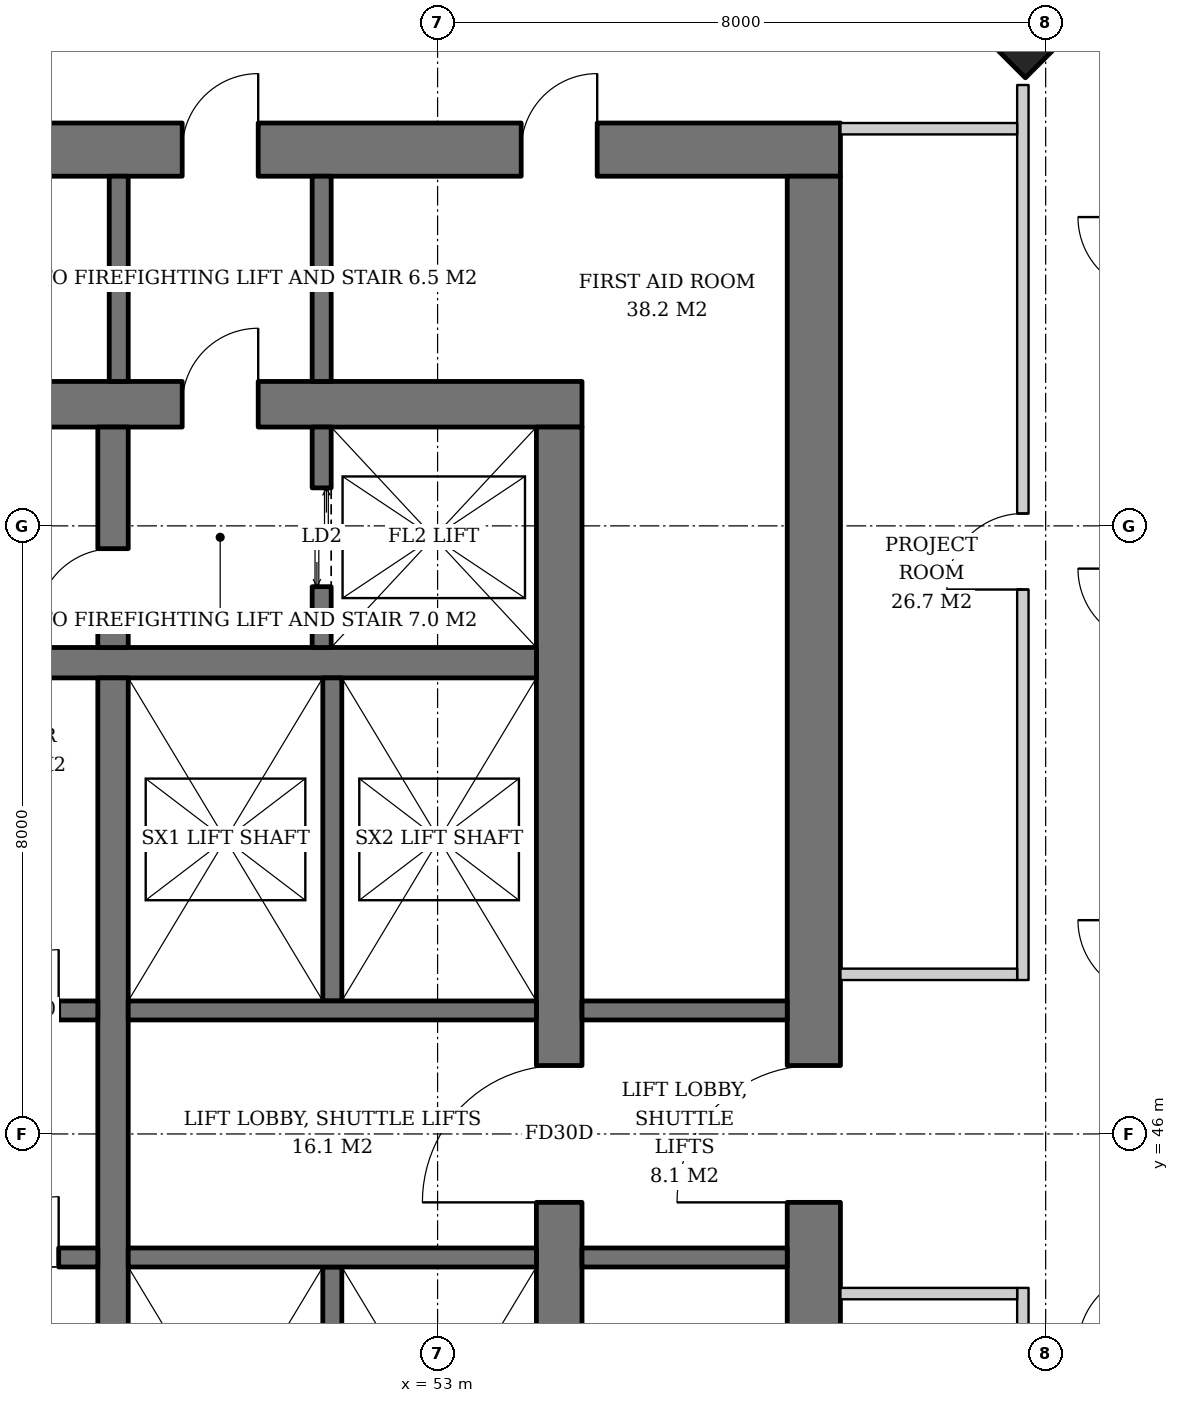
"""IFC4 building model, lengths in metres.
Left out: names, types, materials, properties, quantities, classifications, styles, units other than length and angle.
Written with IfcOpenShell. Run it as: python <this file> out.ifc"""

import sys

from ifc_helpers import new_model, si_unit, direction, frame, frame_2d, origin, origin_2d, place, context, subcontext, project, spatial, rectangle, extrude, element, fill, save


model = new_model("IFC4")
c1 = context("Model", 3, precision=1e-05, world=origin(), true_north=direction((0.0, 1.0)))
c2 = subcontext(c1, "Body", "Model", "MODEL_VIEW")
j1 = project(units=[si_unit("LENGTHUNIT", "METRE"), si_unit("PLANEANGLEUNIT", "RADIAN")], contexts=[c1])
p1 = place(None, origin())
s1 = spatial("IfcSite", under=j1, at=p1, CompositionType="ELEMENT")
p2 = place(p1, origin())
s2 = spatial("IfcBuilding", under=s1, at=p2, CompositionType="ELEMENT")
p3 = place(p2, frame((0.0, 0.0, 150.2)))
s3 = spatial("IfcBuildingStorey", under=s2, at=p3, CompositionType="ELEMENT", Elevation=150.2)
p4 = place(p3, frame((60.771, 61.771, 0.0), z_axis=(-0.031962158256, -0.031962158256, 0.998977898093), x_axis=(0.707106781187, -0.707106781187, 0.0)))
e1 = element("IfcColumn", 1, at=p4, inside=s3, PredefinedType="COLUMN", context=c2, shape_type="SweptSolid", body=[
    extrude(rectangle(XDim=2.6, YDim=2.6, at=origin_2d()), origin(), (0.0, 0.0, 1.0), 3.804),
])
p5 = place(p3, frame((35.1, 55.6, 0.0), z_axis=(0.0, 0.0, 1.0), x_axis=(1.0, 0.0, 0.0)))
e2 = element("IfcWall", 2, at=p5, inside=s3, PredefinedType="SHEAR", context=c2, shape_type="SweptSolid", body=[
    extrude(rectangle(XDim=19.8, YDim=0.6, at=frame_2d((9.9, 0.0))), origin(), (0.0, 0.0, 1.0), 3.8),
])
p6 = place(p5, frame((14.54, 0.0, 0.0)))
e3 = element("IfcOpeningElement", 3, at=p6, cuts=e2, PredefinedType="OPENING", context=c2, shape_type="SweptSolid", body=[
    extrude(rectangle(XDim=1.0, YDim=2.1, at=frame_2d((0.5, 1.05))), frame((0.0, 0.31, 0.0), z_axis=(0.0, -1.0, 0.0), x_axis=(1.0, 0.0, 0.0)), (0.0, 0.0, 1.0), 0.62),
])
p7 = place(p5, frame((2.425, 0.0, 0.0)))
e4 = element("IfcOpeningElement", 4, at=p7, cuts=e2, PredefinedType="OPENING", context=c2, shape_type="SweptSolid", body=[
    extrude(rectangle(XDim=1.0, YDim=2.1, at=frame_2d((0.5, 1.05))), frame((0.0, 0.31, 0.0), z_axis=(0.0, -1.0, 0.0), x_axis=(1.0, 0.0, 0.0)), (0.0, 0.0, 1.0), 0.62),
])
p8 = place(p3, frame((54.6, 36.7, 0.0), z_axis=(0.0, 0.0, 1.0), x_axis=(0.0, 1.0, 0.0)))
e5 = element("IfcWall", 5, at=p8, inside=s3, PredefinedType="SHEAR", context=c2, shape_type="SweptSolid", body=[
    extrude(rectangle(XDim=18.6, YDim=0.6, at=frame_2d((9.3, 0.0))), origin(), (0.0, 0.0, 1.0), 3.8),
])
p9 = place(p8, frame((8.4, 0.0, 0.0)))
e6 = element("IfcOpeningElement", 6, at=p9, cuts=e5, PredefinedType="OPENING", context=c2, shape_type="SweptSolid", body=[
    extrude(rectangle(XDim=1.8, YDim=2.4, at=frame_2d((0.9, 1.2))), frame((0.0, 0.31, 0.0), z_axis=(0.0, -1.0, 0.0), x_axis=(1.0, 0.0, 0.0)), (0.0, 0.0, 1.0), 0.62),
])
p10 = place(p3, frame((31.7, 58.95, 0.0), z_axis=(0.0, 0.0, 1.0), x_axis=(1.0, 0.0, 0.0)))
e7 = element("IfcWall", 7, at=p10, inside=s3, PredefinedType="SHEAR", context=c2, shape_type="SweptSolid", body=[
    extrude(rectangle(XDim=26.6, YDim=0.7, at=frame_2d((13.3, 0.0))), origin(), (0.0, 0.0, 1.0), 3.8),
])
p11 = place(p10, frame((17.94, 0.0, 0.0)))
e8 = element("IfcOpeningElement", 8, at=p11, cuts=e7, PredefinedType="OPENING", context=c2, shape_type="SweptSolid", body=[
    extrude(rectangle(XDim=1.0, YDim=2.1, at=frame_2d((0.5, 1.05))), frame((0.0, 0.36, 0.0), z_axis=(0.0, -1.0, 0.0), x_axis=(1.0, 0.0, 0.0)), (0.0, 0.0, 1.0), 0.72),
])
p12 = place(p10, frame((5.825, 0.0, 0.0)))
e9 = element("IfcOpeningElement", 9, at=p12, cuts=e7, PredefinedType="OPENING", context=c2, shape_type="SweptSolid", body=[
    extrude(rectangle(XDim=1.0, YDim=2.1, at=frame_2d((0.5, 1.05))), frame((0.0, 0.36, 0.0), z_axis=(0.0, -1.0, 0.0), x_axis=(1.0, 0.0, 0.0)), (0.0, 0.0, 1.0), 0.72),
])
p13 = place(p10, frame((1.169, 0.0, 0.0)))
e10 = element("IfcOpeningElement", 10, at=p13, cuts=e7, PredefinedType="OPENING", context=c2, shape_type="SweptSolid", body=[
    extrude(rectangle(XDim=1.0, YDim=2.1, at=frame_2d((0.5, 1.05))), frame((0.0, 0.36, 0.0), z_axis=(0.0, -1.0, 0.0), x_axis=(1.0, 0.0, 0.0)), (0.0, 0.0, 1.0), 0.72),
])
p14 = place(p10, frame((2.683, 0.0, 0.0)))
e11 = element("IfcOpeningElement", 11, at=p14, cuts=e7, PredefinedType="OPENING", context=c2, shape_type="SweptSolid", body=[
    extrude(rectangle(XDim=1.0, YDim=2.1, at=frame_2d((0.5, 1.05))), frame((0.0, 0.36, 0.0), z_axis=(0.0, -1.0, 0.0), x_axis=(1.0, 0.0, 0.0)), (0.0, 0.0, 1.0), 0.72),
])
p15 = place(p10, frame((4.211, 0.0, 0.0)))
e12 = element("IfcOpeningElement", 12, at=p15, cuts=e7, PredefinedType="OPENING", context=c2, shape_type="SweptSolid", body=[
    extrude(rectangle(XDim=1.0, YDim=2.1, at=frame_2d((0.5, 1.05))), frame((0.0, 0.36, 0.0), z_axis=(0.0, -1.0, 0.0), x_axis=(1.0, 0.0, 0.0)), (0.0, 0.0, 1.0), 0.72),
])
p16 = place(p10, frame((8.44, 0.0, 0.0)))
e13 = element("IfcOpeningElement", 13, at=p16, cuts=e7, PredefinedType="OPENING", context=c2, shape_type="SweptSolid", body=[
    extrude(rectangle(XDim=1.0, YDim=2.1, at=frame_2d((0.5, 1.05))), frame((0.0, 0.36, 0.0), z_axis=(0.0, -1.0, 0.0), x_axis=(1.0, 0.0, 0.0)), (0.0, 0.0, 1.0), 0.72),
])
p17 = place(p10, frame((13.342, 0.0, 0.0)))
e14 = element("IfcOpeningElement", 14, at=p17, cuts=e7, PredefinedType="OPENING", context=c2, shape_type="SweptSolid", body=[
    extrude(rectangle(XDim=1.0, YDim=2.1, at=frame_2d((0.5, 1.05))), frame((0.0, 0.36, 0.0), z_axis=(0.0, -1.0, 0.0), x_axis=(1.0, 0.0, 0.0)), (0.0, 0.0, 1.0), 0.72),
])
p18 = place(p10, frame((22.4, 0.0, 0.0)))
e15 = element("IfcOpeningElement", 15, at=p18, cuts=e7, PredefinedType="OPENING", context=c2, shape_type="SweptSolid", body=[
    extrude(rectangle(XDim=1.0, YDim=2.1, at=frame_2d((0.5, 1.05))), frame((0.0, 0.36, 0.0), z_axis=(0.0, -1.0, 0.0), x_axis=(1.0, 0.0, 0.0)), (0.0, 0.0, 1.0), 0.72),
])
p19 = place(p3, frame((57.95, 33.4, 0.0), z_axis=(0.0, 0.0, 1.0), x_axis=(0.0, 1.0, 0.0)))
e16 = element("IfcWall", 16, at=p19, inside=s3, PredefinedType="SHEAR", context=c2, shape_type="SweptSolid", body=[
    extrude(rectangle(XDim=25.2, YDim=0.7, at=frame_2d((12.6, 0.0))), origin(), (0.0, 0.0, 1.0), 3.8),
])
p20 = place(p19, frame((11.7, 0.0, 0.0)))
e17 = element("IfcOpeningElement", 17, at=p20, cuts=e16, PredefinedType="OPENING", context=c2, shape_type="SweptSolid", body=[
    extrude(rectangle(XDim=1.8, YDim=2.4, at=frame_2d((0.9, 1.2))), frame((0.0, 0.36, 0.0), z_axis=(0.0, -1.0, 0.0), x_axis=(1.0, 0.0, 0.0)), (0.0, 0.0, 1.0), 0.72),
])
p21 = place(p3, frame((35.7, 52.2, 0.0), z_axis=(0.0, 0.0, 1.0), x_axis=(1.0, 0.0, 0.0)))
e18 = element("IfcWall", 18, at=p21, inside=s3, PredefinedType="SHEAR", context=c2, shape_type="SweptSolid", body=[
    extrude(rectangle(XDim=18.6, YDim=0.4, at=frame_2d((9.3, 0.0))), origin(), (0.0, 0.0, 1.0), 3.8),
])
p22 = place(p3, frame((48.73, 40.0, 0.0), z_axis=(0.0, 0.0, 1.0), x_axis=(0.0, 1.0, 0.0)))
e19 = element("IfcWall", 19, at=p22, inside=s3, PredefinedType="SHEAR", context=c2, shape_type="SweptSolid", body=[
    extrude(rectangle(XDim=12.0, YDim=0.4, at=frame_2d((6.0, 0.0))), origin(), (0.0, 0.0, 1.0), 3.8),
])
p23 = place(p3, frame((48.73, 52.4, 0.0), z_axis=(0.0, 0.0, 1.0), x_axis=(0.0, 1.0, 0.0)))
e20 = element("IfcWall", 20, at=p23, inside=s3, PredefinedType="SHEAR", context=c2, shape_type="SweptSolid", body=[
    extrude(rectangle(XDim=2.9, YDim=0.4, at=frame_2d((1.45, 0.0))), origin(), (0.0, 0.0, 1.0), 3.8),
])
p24 = place(p23, frame((0.3, 0.0, 0.0)))
e21 = element("IfcOpeningElement", 21, at=p24, cuts=e20, PredefinedType="OPENING", context=c2, shape_type="SweptSolid", body=[
    extrude(rectangle(XDim=1.0, YDim=2.1, at=frame_2d((0.5, 1.05))), frame((0.0, 0.21, 0.0), z_axis=(0.0, -1.0, 0.0), x_axis=(1.0, 0.0, 0.0)), (0.0, 0.0, 1.0), 0.42),
])
p25 = place(p3, frame((51.475, 52.4, 0.0), z_axis=(0.0, 0.0, 1.0), x_axis=(0.0, 1.0, 0.0)))
e22 = element("IfcWall", 22, at=p25, inside=s3, PredefinedType="SHEAR", context=c2, shape_type="SweptSolid", body=[
    extrude(rectangle(XDim=2.9, YDim=0.25, at=frame_2d((1.45, 0.0))), origin(), (0.0, 0.0, 1.0), 3.8),
])
p26 = place(p25, frame((0.8, 0.0, 0.0)))
e23 = element("IfcOpeningElement", 23, at=p26, cuts=e22, PredefinedType="OPENING", context=c2, shape_type="SweptSolid", body=[
    extrude(rectangle(XDim=1.3, YDim=2.2, at=frame_2d((0.65, 1.1))), frame((0.0, 0.135, 0.0), z_axis=(0.0, -1.0, 0.0), x_axis=(1.0, 0.0, 0.0)), (0.0, 0.0, 1.0), 0.27),
])
p27 = place(p3, frame((35.7, 47.625, 0.0), z_axis=(0.0, 0.0, 1.0), x_axis=(1.0, 0.0, 0.0)))
e24 = element("IfcWall", 24, at=p27, inside=s3, PredefinedType="SHEAR", context=c2, shape_type="SweptSolid", body=[
    extrude(rectangle(XDim=12.83, YDim=0.25, at=frame_2d((6.415, 0.0))), origin(), (0.0, 0.0, 1.0), 3.8),
])
p28 = place(p27, frame((0.7, 0.0, 0.0)))
e25 = element("IfcOpeningElement", 25, at=p28, cuts=e24, PredefinedType="OPENING", context=c2, shape_type="SweptSolid", body=[
    extrude(rectangle(XDim=1.1, YDim=2.2, at=frame_2d((0.55, 1.1))), frame((0.0, 0.135, 0.0), z_axis=(0.0, -1.0, 0.0), x_axis=(1.0, 0.0, 0.0)), (0.0, 0.0, 1.0), 0.27),
])
p29 = place(p27, frame((3.45, 0.0, 0.0)))
e26 = element("IfcOpeningElement", 26, at=p29, cuts=e24, PredefinedType="OPENING", context=c2, shape_type="SweptSolid", body=[
    extrude(rectangle(XDim=1.1, YDim=2.2, at=frame_2d((0.55, 1.1))), frame((0.0, 0.135, 0.0), z_axis=(0.0, -1.0, 0.0), x_axis=(1.0, 0.0, 0.0)), (0.0, 0.0, 1.0), 0.27),
])
p30 = place(p27, frame((6.2, 0.0, 0.0)))
e27 = element("IfcOpeningElement", 27, at=p30, cuts=e24, PredefinedType="OPENING", context=c2, shape_type="SweptSolid", body=[
    extrude(rectangle(XDim=1.1, YDim=2.2, at=frame_2d((0.55, 1.1))), frame((0.0, 0.135, 0.0), z_axis=(0.0, -1.0, 0.0), x_axis=(1.0, 0.0, 0.0)), (0.0, 0.0, 1.0), 0.27),
])
p31 = place(p27, frame((8.95, 0.0, 0.0)))
e28 = element("IfcOpeningElement", 28, at=p31, cuts=e24, PredefinedType="OPENING", context=c2, shape_type="SweptSolid", body=[
    extrude(rectangle(XDim=1.1, YDim=2.2, at=frame_2d((0.55, 1.1))), frame((0.0, 0.135, 0.0), z_axis=(0.0, -1.0, 0.0), x_axis=(1.0, 0.0, 0.0)), (0.0, 0.0, 1.0), 0.27),
])
p32 = place(p27, frame((11.515, 0.0, 0.0)))
e29 = element("IfcOpeningElement", 29, at=p32, cuts=e24, PredefinedType="OPENING", context=c2, shape_type="SweptSolid", body=[
    extrude(rectangle(XDim=0.8, YDim=2.0, at=frame_2d((0.4, 1.0))), frame((0.0, 0.135, 0.0), z_axis=(0.0, -1.0, 0.0), x_axis=(1.0, 0.0, 0.0)), (0.0, 0.0, 1.0), 0.27),
])
p33 = place(p3, frame((35.7, 44.375, 0.0), z_axis=(0.0, 0.0, 1.0), x_axis=(1.0, 0.0, 0.0)))
e30 = element("IfcWall", 30, at=p33, inside=s3, PredefinedType="SHEAR", context=c2, shape_type="SweptSolid", body=[
    extrude(rectangle(XDim=12.83, YDim=0.25, at=frame_2d((6.415, 0.0))), origin(), (0.0, 0.0, 1.0), 3.8),
])
p34 = place(p33, frame((0.7, 0.0, 0.0)))
e31 = element("IfcOpeningElement", 31, at=p34, cuts=e30, PredefinedType="OPENING", context=c2, shape_type="SweptSolid", body=[
    extrude(rectangle(XDim=1.1, YDim=2.2, at=frame_2d((0.55, 1.1))), frame((0.0, 0.135, 0.0), z_axis=(0.0, -1.0, 0.0), x_axis=(1.0, 0.0, 0.0)), (0.0, 0.0, 1.0), 0.27),
])
p35 = place(p33, frame((3.45, 0.0, 0.0)))
e32 = element("IfcOpeningElement", 32, at=p35, cuts=e30, PredefinedType="OPENING", context=c2, shape_type="SweptSolid", body=[
    extrude(rectangle(XDim=1.1, YDim=2.2, at=frame_2d((0.55, 1.1))), frame((0.0, 0.135, 0.0), z_axis=(0.0, -1.0, 0.0), x_axis=(1.0, 0.0, 0.0)), (0.0, 0.0, 1.0), 0.27),
])
p36 = place(p33, frame((6.2, 0.0, 0.0)))
e33 = element("IfcOpeningElement", 33, at=p36, cuts=e30, PredefinedType="OPENING", context=c2, shape_type="SweptSolid", body=[
    extrude(rectangle(XDim=1.1, YDim=2.2, at=frame_2d((0.55, 1.1))), frame((0.0, 0.135, 0.0), z_axis=(0.0, -1.0, 0.0), x_axis=(1.0, 0.0, 0.0)), (0.0, 0.0, 1.0), 0.27),
])
p37 = place(p33, frame((8.95, 0.0, 0.0)))
e34 = element("IfcOpeningElement", 34, at=p37, cuts=e30, PredefinedType="OPENING", context=c2, shape_type="SweptSolid", body=[
    extrude(rectangle(XDim=1.1, YDim=2.2, at=frame_2d((0.55, 1.1))), frame((0.0, 0.135, 0.0), z_axis=(0.0, -1.0, 0.0), x_axis=(1.0, 0.0, 0.0)), (0.0, 0.0, 1.0), 0.27),
])
p38 = place(p33, frame((11.515, 0.0, 0.0)))
e35 = element("IfcOpeningElement", 35, at=p38, cuts=e30, PredefinedType="OPENING", context=c2, shape_type="SweptSolid", body=[
    extrude(rectangle(XDim=0.8, YDim=2.0, at=frame_2d((0.4, 1.0))), frame((0.0, 0.135, 0.0), z_axis=(0.0, -1.0, 0.0), x_axis=(1.0, 0.0, 0.0)), (0.0, 0.0, 1.0), 0.27),
])
p39 = place(p3, frame((51.615, 47.75, 0.0), z_axis=(0.0, 0.0, 1.0), x_axis=(0.0, 1.0, 0.0)))
e36 = element("IfcWall", 36, at=p39, inside=s3, PredefinedType="SHEAR", context=c2, shape_type="SweptSolid", body=[
    extrude(rectangle(XDim=4.25, YDim=0.25, at=frame_2d((2.125, 0.0))), origin(), (0.0, 0.0, 1.0), 3.8),
])
p40 = place(p3, frame((48.93, 47.625, 0.0), z_axis=(0.0, 0.0, 1.0), x_axis=(1.0, 0.0, 0.0)))
e37 = element("IfcWall", 37, at=p40, inside=s3, PredefinedType="SHEAR", context=c2, shape_type="SweptSolid", body=[
    extrude(rectangle(XDim=5.37, YDim=0.25, at=frame_2d((2.685, 0.0))), origin(), (0.0, 0.0, 1.0), 3.8),
])
p41 = place(p3, frame((51.615, 44.25, 0.0), z_axis=(0.0, 0.0, 1.0), x_axis=(0.0, -1.0, 0.0)))
e38 = element("IfcWall", 38, at=p41, inside=s3, PredefinedType="SHEAR", context=c2, shape_type="SweptSolid", body=[
    extrude(rectangle(XDim=4.25, YDim=0.25, at=frame_2d((2.125, 0.0))), origin(), (0.0, 0.0, 1.0), 3.8),
])
p42 = place(p3, frame((48.93, 44.375, 0.0), z_axis=(0.0, 0.0, 1.0), x_axis=(1.0, 0.0, 0.0)))
e39 = element("IfcWall", 39, at=p42, inside=s3, PredefinedType="SHEAR", context=c2, shape_type="SweptSolid", body=[
    extrude(rectangle(XDim=5.37, YDim=0.25, at=frame_2d((2.685, 0.0))), origin(), (0.0, 0.0, 1.0), 3.8),
])
for number, where, z_axis, x_axis in (
    (40, (48.805, 55.9, 0.0), (0.0, 0.0, 1.0), (0.0, 1.0, 0.0)),
    (41, (51.475, 55.9, 0.0), (0.0, 0.0, 1.0), (0.0, 1.0, 0.0)),
    (42, (54.9, 44.375, 0.0), (0.0, 0.0, 1.0), (1.0, 0.0, 0.0)),
    (43, (54.9, 47.625, 0.0), (0.0, 0.0, 1.0), (1.0, 0.0, 0.0)),
):
    element("IfcWall", number, at=place(p3, frame(where, z_axis=z_axis, x_axis=x_axis)), inside=s3, PredefinedType="SOLIDWALL", context=c2, shape_type="SweptSolid", body=[
        extrude(rectangle(XDim=2.7, YDim=0.25, at=frame_2d((1.35, 0.0))), origin(), (0.0, 0.0, 1.0), 3.62),
    ])
p43 = place(p3, frame((60.7, 32.2, 0.0), z_axis=(0.0, 0.0, 1.0), x_axis=(0.0, 1.0, 0.0)))
e44 = element("IfcWall", 44, at=p43, inside=s3, PredefinedType="PARTITIONING", context=c2, shape_type="SweptSolid", body=[
    extrude(rectangle(XDim=11.775, YDim=0.15, at=frame_2d((5.888, 0.0))), origin(), (0.0, 0.0, 1.0), 2.72),
])
p44 = place(p43, frame((5.637, 0.0, 0.0)))
e45 = element("IfcOpeningElement", 45, at=p44, cuts=e44, PredefinedType="OPENING", context=c2, shape_type="SweptSolid", body=[
    extrude(rectangle(XDim=1.0, YDim=2.1, at=frame_2d((0.5, 1.05))), frame((0.0, 0.085, 0.0), z_axis=(0.0, -1.0, 0.0), x_axis=(1.0, 0.0, 0.0)), (0.0, 0.0, 1.0), 0.17),
])
p45 = place(p3, frame((58.3, 43.9, 0.0), z_axis=(0.0, 0.0, 1.0), x_axis=(1.0, 0.0, 0.0)))
e46 = element("IfcWall", 46, at=p45, inside=s3, PredefinedType="PARTITIONING", context=c2, shape_type="SweptSolid", body=[
    extrude(rectangle(XDim=2.325, YDim=0.15, at=frame_2d((1.163, 0.0))), origin(), (0.0, 0.0, 1.0), 3.62),
])
p46 = place(p3, frame((60.7, 48.025, 0.0), z_axis=(0.0, 0.0, 1.0), x_axis=(0.0, 1.0, 0.0)))
e47 = element("IfcWall", 47, at=p46, inside=s3, PredefinedType="PARTITIONING", context=c2, shape_type="SweptSolid", body=[
    extrude(rectangle(XDim=11.775, YDim=0.15, at=frame_2d((5.888, 0.0))), origin(), (0.0, 0.0, 1.0), 2.806),
])
p47 = place(p46, frame((5.137, 0.0, 0.0)))
e48 = element("IfcOpeningElement", 48, at=p47, cuts=e47, PredefinedType="OPENING", context=c2, shape_type="SweptSolid", body=[
    extrude(rectangle(XDim=1.0, YDim=2.1, at=frame_2d((0.5, 1.05))), frame((0.0, 0.085, 0.0), z_axis=(0.0, -1.0, 0.0), x_axis=(1.0, 0.0, 0.0)), (0.0, 0.0, 1.0), 0.17),
])
for number, where, z_axis, x_axis in (
    (49, (58.3, 48.1, 0.0), (0.0, 0.0, 1.0), (1.0, 0.0, 0.0)),
    (50, (58.3, 59.225, 0.0), (0.0, 0.0, 1.0), (1.0, 0.0, 0.0)),
):
    element("IfcWall", number, at=place(p3, frame(where, z_axis=z_axis, x_axis=x_axis)), inside=s3, PredefinedType="PARTITIONING", context=c2, shape_type="SweptSolid", body=[
        extrude(rectangle(XDim=2.325, YDim=0.15, at=frame_2d((1.163, 0.0))), origin(), (0.0, 0.0, 1.0), 3.62),
    ])
p48 = place(p26, origin())
e51 = element("IfcDoor", 51, at=p48, inside=s3, OperationType="DOUBLE_DOOR_SLIDING", PredefinedType="DOOR", context=c2, shape_type="SweptSolid", body=[
    extrude(rectangle(XDim=1.3, YDim=2.2, at=frame_2d((0.65, 1.1))), frame((0.0, 0.025, 0.0), z_axis=(0.0, -1.0, 0.0), x_axis=(1.0, 0.0, 0.0)), (0.0, 0.0, 1.0), 0.05),
])
fill(e23, e51)
p49 = place(p32, origin())
e52 = element("IfcDoor", 52, at=p49, inside=s3, OperationType="SINGLE_SWING_RIGHT", PredefinedType="DOOR", context=c2, shape_type="SweptSolid", body=[
    extrude(rectangle(XDim=0.8, YDim=2.0, at=frame_2d((0.4, 1.0))), frame((0.0, 0.025, 0.0), z_axis=(0.0, -1.0, 0.0), x_axis=(1.0, 0.0, 0.0)), (0.0, 0.0, 1.0), 0.05),
])
fill(e29, e52)
p50 = place(p38, origin())
e53 = element("IfcDoor", 53, at=p50, inside=s3, OperationType="SINGLE_SWING_RIGHT", PredefinedType="DOOR", context=c2, shape_type="SweptSolid", body=[
    extrude(rectangle(XDim=0.8, YDim=2.0, at=frame_2d((0.4, 1.0))), frame((0.0, 0.025, 0.0), z_axis=(0.0, -1.0, 0.0), x_axis=(1.0, 0.0, 0.0)), (0.0, 0.0, 1.0), 0.05),
])
fill(e35, e53)
p51 = place(p24, origin())
e54 = element("IfcDoor", 54, at=p51, inside=s3, OperationType="SINGLE_SWING_LEFT", PredefinedType="DOOR", context=c2, shape_type="SweptSolid", body=[
    extrude(rectangle(XDim=1.0, YDim=2.1, at=frame_2d((0.5, 1.05))), frame((0.0, 0.025, 0.0), z_axis=(0.0, -1.0, 0.0), x_axis=(1.0, 0.0, 0.0)), (0.0, 0.0, 1.0), 0.05),
])
fill(e21, e54)
p52 = place(p6, origin())
e55 = element("IfcDoor", 55, at=p52, inside=s3, OperationType="SINGLE_SWING_RIGHT", PredefinedType="DOOR", context=c2, shape_type="SweptSolid", body=[
    extrude(rectangle(XDim=1.0, YDim=2.1, at=frame_2d((0.5, 1.05))), frame((0.0, 0.025, 0.0), z_axis=(0.0, -1.0, 0.0), x_axis=(1.0, 0.0, 0.0)), (0.0, 0.0, 1.0), 0.05),
])
fill(e3, e55)
p53 = place(p9, origin())
e56 = element("IfcDoor", 56, at=p53, inside=s3, OperationType="DOUBLE_DOOR_SINGLE_SWING", PredefinedType="DOOR", context=c2, shape_type="SweptSolid", body=[
    extrude(rectangle(XDim=1.8, YDim=2.4, at=frame_2d((0.9, 1.2))), frame((0.0, 0.025, 0.0), z_axis=(0.0, -1.0, 0.0), x_axis=(1.0, 0.0, 0.0)), (0.0, 0.0, 1.0), 0.05),
])
fill(e6, e56)
p54 = place(p20, origin())
e57 = element("IfcDoor", 57, at=p54, inside=s3, OperationType="DOUBLE_DOOR_SINGLE_SWING", PredefinedType="DOOR", context=c2, shape_type="SweptSolid", body=[
    extrude(rectangle(XDim=1.8, YDim=2.4, at=frame_2d((0.9, 1.2))), frame((0.0, 0.025, 0.0), z_axis=(0.0, -1.0, 0.0), x_axis=(1.0, 0.0, 0.0)), (0.0, 0.0, 1.0), 0.05),
])
fill(e17, e57)
p55 = place(p11, origin())
e58 = element("IfcDoor", 58, at=p55, inside=s3, OperationType="SINGLE_SWING_RIGHT", PredefinedType="DOOR", context=c2, shape_type="SweptSolid", body=[
    extrude(rectangle(XDim=1.0, YDim=2.1, at=frame_2d((0.5, 1.05))), frame((0.0, 0.025, 0.0), z_axis=(0.0, -1.0, 0.0), x_axis=(1.0, 0.0, 0.0)), (0.0, 0.0, 1.0), 0.05),
])
fill(e8, e58)
p56 = place(p18, origin())
e59 = element("IfcDoor", 59, at=p56, inside=s3, OperationType="SINGLE_SWING_RIGHT", PredefinedType="DOOR", context=c2, shape_type="SweptSolid", body=[
    extrude(rectangle(XDim=1.0, YDim=2.1, at=frame_2d((0.5, 1.05))), frame((0.0, -0.29, 0.0), z_axis=(0.0, -1.0, 0.0), x_axis=(1.0, 0.0, 0.0)), (0.0, 0.0, 1.0), 0.05),
])
fill(e15, e59)
p57 = place(p47, origin())
e60 = element("IfcDoor", 60, at=p57, inside=s3, OperationType="SINGLE_SWING_LEFT", PredefinedType="DOOR", context=c2, shape_type="SweptSolid", body=[
    extrude(rectangle(XDim=1.0, YDim=2.1, at=frame_2d((0.5, 1.05))), frame((0.0, 0.025, 0.0), z_axis=(0.0, -1.0, 0.0), x_axis=(1.0, 0.0, 0.0)), (0.0, 0.0, 1.0), 0.05),
])
fill(e48, e60)
save(model, sys.argv[1])
